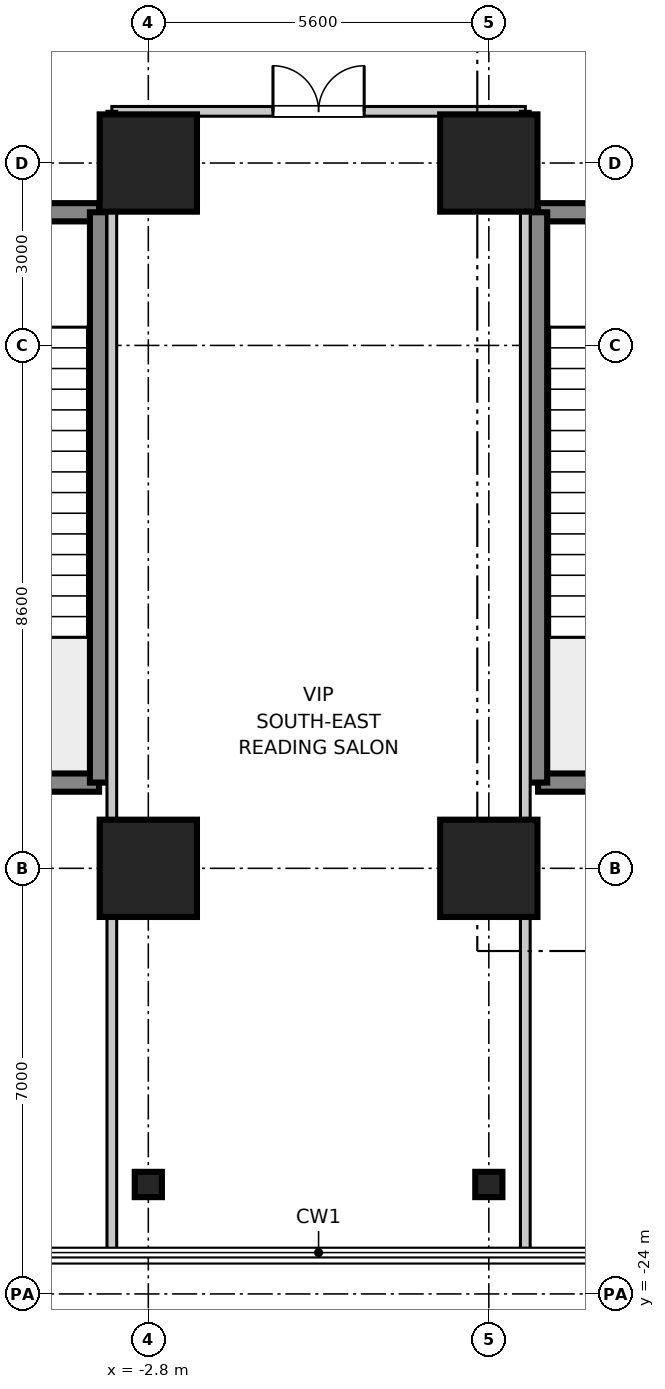
"""IFC4 building model, lengths in metres.
Left out: names, types, materials, properties, quantities, classifications, styles, units other than length and angle.
Written with IfcOpenShell. Run it as: python <this file> out.ifc"""

import sys

from ifc_helpers import new_model, si_unit, direction, frame, frame_2d, origin, origin_2d, place, context, subcontext, project, spatial, rectangle, i_section, extrude, source, transform, mapped, element, fill, save


model = new_model("IFC4")
c1 = context("Model", 3, precision=1e-05, world=origin(), true_north=direction((0.0, 1.0)))
c2 = subcontext(c1, "Body", "Model", "MODEL_VIEW")
j1 = project(units=[si_unit("LENGTHUNIT", "METRE"), si_unit("PLANEANGLEUNIT", "RADIAN")], contexts=[c1])
p1 = place(None, origin())
s1 = spatial("IfcSite", under=j1, at=p1, CompositionType="ELEMENT")
p2 = place(p1, origin())
s2 = spatial("IfcBuilding", under=s1, at=p2, CompositionType="ELEMENT")
p3 = place(p2, frame((0.0, 0.0, 21.6)))
s3 = spatial("IfcBuildingStorey", under=s2, at=p3, CompositionType="ELEMENT", Elevation=21.6)
m1 = source(origin(), c2, "Body", "SweptSolid", [
    extrude(rectangle(XDim=1.6, YDim=1.6, at=origin_2d()), origin(), (0.0, 0.0, 1.0), 5.355),
])
for number, where, z_axis, x_axis in (
    (1, (-2.8, -17.0, 0.0), (0.0, 0.0, 1.0), (1.0, 0.0, 0.0)),
    (2, (-2.8, -5.4, 0.0), (0.0, 0.0, 1.0), (1.0, 0.0, 0.0)),
    (3, (2.8, -17.0, 0.0), (0.0, 0.0, 1.0), (1.0, 0.0, 0.0)),
    (4, (2.8, -5.4, 0.0), (0.0, 0.0, 1.0), (1.0, 0.0, 0.0)),
):
    element("IfcColumn", number, at=place(p3, frame(where, z_axis=z_axis, x_axis=x_axis)), inside=s3, PredefinedType="COLUMN", context=c2, shape_type="MappedRepresentation", body=[
        mapped(m1, transform((0.0, 0.0, 0.0), scale=1.0)),
    ])
m2 = source(origin(), c2, "Body", "SweptSolid", [
    extrude(i_section(OverallWidth=0.416, OverallDepth=0.446, WebThickness=0.025, FlangeThickness=0.04, at=origin_2d()), origin(), (0.0, 0.0, 1.0), 5.255),
])
for number, where, z_axis, x_axis in (
    (5, (-2.8, -22.2, 0.0), (0.0, 0.0, 1.0), (0.0, 1.0, 0.0)),
    (6, (2.8, -22.2, 0.0), (0.0, 0.0, 1.0), (0.0, 1.0, 0.0)),
):
    element("IfcColumn", number, at=place(p3, frame(where, z_axis=z_axis, x_axis=x_axis)), inside=s3, PredefinedType="COLUMN", context=c2, shape_type="MappedRepresentation", body=[
        mapped(m2, transform((0.0, 0.0, 0.0), scale=1.0)),
    ])
m3 = source(origin(), c2, "Body", "SweptSolid", [
    extrude(rectangle(XDim=3.98, YDim=0.3, at=frame_2d((1.99, 0.0))), origin(), (0.0, 0.0, 1.0), 4.98),
])
for number, where, z_axis, x_axis in (
    (7, (3.61, -15.59, 0.0), (0.0, 0.0, 1.0), (1.0, 0.0, 0.0)),
    (8, (3.61, -6.21, 0.0), (0.0, 0.0, 1.0), (1.0, 0.0, 0.0)),
):
    element("IfcWall", number, at=place(p3, frame(where, z_axis=z_axis, x_axis=x_axis)), inside=s3, PredefinedType="SHEAR", context=c2, shape_type="MappedRepresentation", body=[
        mapped(m3, transform((0.0, 0.0, 0.0), scale=1.0)),
    ])
m4 = source(origin(), c2, "Body", "SweptSolid", [
    extrude(rectangle(XDim=9.38, YDim=0.3, at=frame_2d((4.69, 0.0))), origin(), (0.0, 0.0, 1.0), 4.98),
])
p4 = place(p3, frame((3.61, -15.59, 0.0), z_axis=(0.0, 0.0, 1.0), x_axis=(0.0, 1.0, 0.0)))
e9 = element("IfcWall", 9, at=p4, inside=s3, PredefinedType="SHEAR", context=c2, shape_type="MappedRepresentation", body=[
    mapped(m4, transform((0.0, 0.0, 0.0), scale=1.0)),
])
p5 = place(p3, frame((-7.59, -15.59, 0.0), z_axis=(0.0, 0.0, 1.0), x_axis=(1.0, 0.0, 0.0)))
e10 = element("IfcWall", 10, at=p5, inside=s3, PredefinedType="SHEAR", context=c2, shape_type="MappedRepresentation", body=[
    mapped(m3, transform((0.0, 0.0, 0.0), scale=1.0)),
])
p6 = place(p3, frame((-7.59, -6.21, 0.0), z_axis=(0.0, 0.0, 1.0), x_axis=(1.0, 0.0, 0.0)))
e11 = element("IfcWall", 11, at=p6, inside=s3, PredefinedType="SHEAR", context=c2, shape_type="MappedRepresentation", body=[
    mapped(m3, transform((0.0, 0.0, 0.0), scale=1.0)),
])
p7 = place(p6, frame((1.44, 0.0, 0.0)))
e12 = element("IfcOpeningElement", 12, at=p7, cuts=e11, PredefinedType="OPENING", context=c2, shape_type="SweptSolid", body=[
    extrude(rectangle(XDim=1.1, YDim=2.15, at=frame_2d((0.55, 1.075))), frame((0.0, 0.16, 0.0), z_axis=(0.0, -1.0, 0.0), x_axis=(1.0, 0.0, 0.0)), (0.0, 0.0, 1.0), 0.32),
])
p8 = place(p3, frame((-3.61, -15.59, 0.0), z_axis=(0.0, 0.0, 1.0), x_axis=(0.0, 1.0, 0.0)))
e13 = element("IfcWall", 13, at=p8, inside=s3, PredefinedType="SHEAR", context=c2, shape_type="MappedRepresentation", body=[
    mapped(m4, transform((0.0, 0.0, 0.0), scale=1.0)),
])
m5 = source(origin(), c2, "Body", "SweptSolid", [
    extrude(rectangle(XDim=6.8, YDim=0.16, at=frame_2d((3.4, 0.0))), origin(), (0.0, 0.0, 1.0), 3.1),
])
p9 = place(p3, frame((-3.4, -4.55, 0.0), z_axis=(0.0, 0.0, 1.0), x_axis=(1.0, 0.0, 0.0)))
e14 = element("IfcWall", 14, at=p9, inside=s3, PredefinedType="PARTITIONING", context=c2, shape_type="MappedRepresentation", body=[
    mapped(m5, transform((0.0, 0.0, 0.0), scale=1.0)),
])
p10 = place(p9, frame((2.65, 0.0, 0.0)))
e15 = element("IfcOpeningElement", 15, at=p10, cuts=e14, PredefinedType="OPENING", context=c2, shape_type="SweptSolid", body=[
    extrude(rectangle(XDim=1.5, YDim=2.15, at=frame_2d((0.75, 1.075))), frame((0.0, 0.09, 0.0), z_axis=(0.0, -1.0, 0.0), x_axis=(1.0, 0.0, 0.0)), (0.0, 0.0, 1.0), 0.18),
])
m6 = source(origin(), c2, "Body", "SweptSolid", [
    extrude(rectangle(XDim=18.71, YDim=0.16, at=frame_2d((9.355, 0.0))), origin(), (0.0, 0.0, 1.0), 3.1),
])
for number, where, z_axis, x_axis in (
    (16, (-3.4, -23.26, 0.0), (0.0, 0.0, 1.0), (0.0, 1.0, 0.0)),
    (17, (3.4, -23.26, 0.0), (0.0, 0.0, 1.0), (0.0, 1.0, 0.0)),
):
    element("IfcWall", number, at=place(p3, frame(where, z_axis=z_axis, x_axis=x_axis)), inside=s3, PredefinedType="PARTITIONING", context=c2, shape_type="MappedRepresentation", body=[
        mapped(m6, transform((0.0, 0.0, 0.0), scale=1.0)),
    ])
m7 = source(origin(), c2, "Body", "SweptSolid", [
    extrude(rectangle(XDim=1.5, YDim=2.15, at=frame_2d((0.75, 1.075))), frame((0.0, 0.025, 0.0), z_axis=(0.0, -1.0, 0.0), x_axis=(1.0, 0.0, 0.0)), (0.0, 0.0, 1.0), 0.05),
])
p11 = place(p10, frame((1.5, 0.0, 0.0), z_axis=(0.0, 0.0, 1.0), x_axis=(-1.0, 0.0, 0.0)))
e18 = element("IfcDoor", 18, at=p11, inside=s3, OperationType="DOUBLE_DOOR_SINGLE_SWING", PredefinedType="DOOR", context=c2, shape_type="MappedRepresentation", body=[
    mapped(m7, transform((0.0, 0.0, 0.0), scale=1.0)),
])
fill(e15, e18)
save(model, sys.argv[1])
